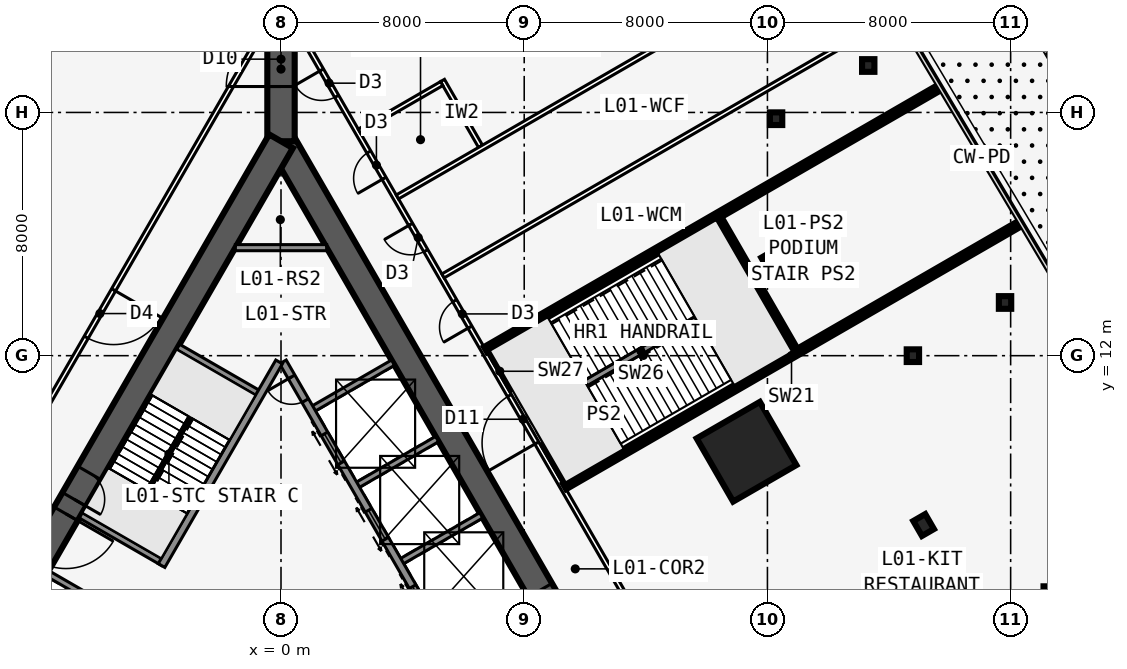
"""IFC4 building model, lengths in metres.
Left out: names, types, materials, properties, quantities, classifications, styles, units other than length and angle.
Written with IfcOpenShell. Run it as: python <this file> out.ifc"""

import sys

from ifc_helpers import new_model, si_unit, direction, frame, frame_2d, origin, origin_2d, place, context, subcontext, project, spatial, rectangle, i_section, extrude, element, fill, save


model = new_model("IFC4")
c1 = context("Model", 3, precision=1e-05, world=origin(), true_north=direction((0.0, 1.0)))
c2 = subcontext(c1, "Body", "Model", "MODEL_VIEW")
j1 = project(units=[si_unit("LENGTHUNIT", "METRE"), si_unit("PLANEANGLEUNIT", "RADIAN")], contexts=[c1])
p1 = place(None, origin())
s1 = spatial("IfcSite", under=j1, at=p1, CompositionType="ELEMENT")
p2 = place(p1, origin())
s2 = spatial("IfcBuilding", under=s1, at=p2, CompositionType="ELEMENT")
p3 = place(p2, frame((0.0, 0.0, 6.0)))
s3 = spatial("IfcBuildingStorey", under=s2, at=p3, CompositionType="ELEMENT", Elevation=6.0)
p4 = place(p3, frame((16.5, -9.526, 0.0), z_axis=(0.0, 0.0, 1.0), x_axis=(-0.499999749417, 0.866025548458, 0.0)))
e1 = element("IfcWall", 1, at=p4, inside=s3, PredefinedType="SHEAR", context=c2, shape_type="SweptSolid", body=[
    extrude(rectangle(XDim=33.0, YDim=0.9, at=frame_2d((16.5, 0.0))), origin(), (0.0, 0.0, 1.0), 5.0),
])
p5 = place(p4, frame((14.15, 0.0, 0.0)))
e2 = element("IfcOpeningElement", 2, at=p5, cuts=e1, PredefinedType="OPENING", context=c2, shape_type="SweptSolid", body=[
    extrude(rectangle(XDim=1.8, YDim=2.13, at=frame_2d((0.9, 1.065))), frame((0.0, 0.46, 0.0), z_axis=(0.0, -1.0, 0.0), x_axis=(1.0, 0.0, 0.0)), (0.0, 0.0, 1.0), 0.92),
])
p6 = place(p4, frame((12.6, 0.0, 0.0)))
e3 = element("IfcOpeningElement", 3, at=p6, cuts=e1, PredefinedType="OPENING", context=c2, shape_type="SweptSolid", body=[
    extrude(rectangle(XDim=1.0, YDim=2.13, at=frame_2d((0.5, 1.065))), frame((0.0, 0.46, 0.0), z_axis=(0.0, -1.0, 0.0), x_axis=(1.0, 0.0, 0.0)), (0.0, 0.0, 1.0), 0.92),
])
p7 = place(p3, frame((5.379, 2.586, 0.0), z_axis=(0.0, 0.0, 1.0), x_axis=(-0.500001375892, 0.866024609411, 0.0)))
e4 = element("IfcWall", 4, at=p7, inside=s3, PredefinedType="SOLIDWALL", context=c2, shape_type="SweptSolid", body=[
    extrude(rectangle(XDim=10.633, YDim=0.25, at=frame_2d((5.316, 0.0))), origin(), (0.0, 0.0, 1.0), 4.75),
])
p8 = place(p7, frame((9.164, 0.0, 0.0)))
e5 = element("IfcOpeningElement", 5, at=p8, cuts=e4, PredefinedType="OPENING", context=c2, shape_type="SweptSolid", body=[
    extrude(rectangle(XDim=0.9, YDim=2.13, at=frame_2d((0.45, 1.065))), frame((0.0, 0.135, 0.0), z_axis=(0.0, -1.0, 0.0), x_axis=(1.0, 0.0, 0.0)), (0.0, 0.0, 1.0), 0.27),
])
p9 = place(p7, frame((1.0, 0.0, 0.0)))
e6 = element("IfcOpeningElement", 6, at=p9, cuts=e4, PredefinedType="OPENING", context=c2, shape_type="SweptSolid", body=[
    extrude(rectangle(XDim=1.1, YDim=2.13, at=frame_2d((0.55, 1.065))), frame((0.0, 0.135, 0.0), z_axis=(0.0, -1.0, 0.0), x_axis=(1.0, 0.0, 0.0)), (0.0, 0.0, 1.0), 0.27),
])
p10 = place(p7, frame((3.9, 0.0, 0.0)))
e7 = element("IfcOpeningElement", 7, at=p10, cuts=e4, PredefinedType="OPENING", context=c2, shape_type="SweptSolid", body=[
    extrude(rectangle(XDim=1.1, YDim=2.13, at=frame_2d((0.55, 1.065))), frame((0.0, 0.135, 0.0), z_axis=(0.0, -1.0, 0.0), x_axis=(1.0, 0.0, 0.0)), (0.0, 0.0, 1.0), 0.27),
])
p11 = place(p7, frame((6.8, 0.0, 0.0)))
e8 = element("IfcOpeningElement", 8, at=p11, cuts=e4, PredefinedType="OPENING", context=c2, shape_type="SweptSolid", body=[
    extrude(rectangle(XDim=1.1, YDim=2.13, at=frame_2d((0.55, 1.065))), frame((0.0, 0.135, 0.0), z_axis=(0.0, -1.0, 0.0), x_axis=(1.0, 0.0, 0.0)), (0.0, 0.0, 1.0), 0.27),
])
for number, where, z_axis, x_axis in (
    (9, (3.879, 5.184, 0.0), (0.0, 0.0, 1.0), (0.866, 0.5, 0.0)),
    (10, (2.429, 7.696, 0.0), (0.0, 0.0, 1.0), (0.866, 0.5, 0.0)),
    (11, (0.979, 10.207, 0.0), (0.0, 0.0, 1.0), (0.866, 0.5, 0.0)),
):
    element("IfcWall", number, at=place(p3, frame(where, z_axis=z_axis, x_axis=x_axis)), inside=s3, PredefinedType="SOLIDWALL", context=c2, shape_type="SweptSolid", body=[
        extrude(rectangle(XDim=3.125, YDim=0.2, at=frame_2d((1.562, 0.0))), origin(), (0.0, 0.0, 1.0), 4.75),
    ])
p12 = place(p3, frame((0.0, 19.052, 0.0), z_axis=(0.0, 0.0, 1.0), x_axis=(-0.499999749417, -0.866025548458, 0.0)))
e12 = element("IfcWall", 12, at=p12, inside=s3, PredefinedType="SHEAR", context=c2, shape_type="SweptSolid", body=[
    extrude(rectangle(XDim=33.0, YDim=0.9, at=frame_2d((16.5, 0.0))), origin(), (0.0, 0.0, 1.0), 5.0),
])
p13 = place(p12, frame((14.15, 0.0, 0.0)))
e13 = element("IfcOpeningElement", 13, at=p13, cuts=e12, PredefinedType="OPENING", context=c2, shape_type="SweptSolid", body=[
    extrude(rectangle(XDim=1.8, YDim=2.13, at=frame_2d((0.9, 1.065))), frame((0.0, 0.46, 0.0), z_axis=(0.0, -1.0, 0.0), x_axis=(1.0, 0.0, 0.0)), (0.0, 0.0, 1.0), 0.92),
])
p14 = place(p12, frame((12.6, 0.0, 0.0)))
e14 = element("IfcOpeningElement", 14, at=p14, cuts=e12, PredefinedType="OPENING", context=c2, shape_type="SweptSolid", body=[
    extrude(rectangle(XDim=1.0, YDim=2.13, at=frame_2d((0.5, 1.065))), frame((0.0, 0.46, 0.0), z_axis=(0.0, -1.0, 0.0), x_axis=(1.0, 0.0, 0.0)), (0.0, 0.0, 1.0), 0.92),
])
p15 = place(p3, frame((-0.062, 11.794, 0.0), z_axis=(0.0, 0.0, 1.0), x_axis=(-0.500006680225, -0.86602154692, 0.0)))
e15 = element("IfcWall", 15, at=p15, inside=s3, PredefinedType="SOLIDWALL", context=c2, shape_type="SweptSolid", body=[
    extrude(rectangle(XDim=7.733, YDim=0.25, at=frame_2d((3.866, 0.0))), origin(), (0.0, 0.0, 1.0), 4.75),
])
for number, where, z_axis, x_axis in (
    (16, (-0.679, 10.727, 0.0), (0.0, 0.0, 1.0), (-0.866, 0.5, 0.0)),
    (17, (-3.879, 5.184, 0.0), (0.0, 0.0, 1.0), (-0.866, 0.5, 0.0)),
    (18, (-4.979, 3.279, 0.0), (0.0, 0.0, 1.0), (-0.866, 0.5, 0.0)),
):
    element("IfcWall", number, at=place(p3, frame(where, z_axis=z_axis, x_axis=x_axis)), inside=s3, PredefinedType="SOLIDWALL", context=c2, shape_type="SweptSolid", body=[
        extrude(rectangle(XDim=3.125, YDim=0.2, at=frame_2d((1.562, 0.0))), origin(), (0.0, 0.0, 1.0), 4.75),
    ])
p16 = place(p3, frame((0.0, 19.052, 0.0), z_axis=(0.0, 0.0, 1.0), x_axis=(0.0, 1.0, 0.0)))
e19 = element("IfcWall", 19, at=p16, inside=s3, PredefinedType="SHEAR", context=c2, shape_type="SweptSolid", body=[
    extrude(rectangle(XDim=4.746, YDim=0.9, at=frame_2d((2.373, 0.0))), origin(), (0.0, 0.0, 1.0), 5.0),
])
p17 = place(p16, frame((1.8, 0.0, 0.0)))
e20 = element("IfcOpeningElement", 20, at=p17, cuts=e19, PredefinedType="OPENING", context=c2, shape_type="SweptSolid", body=[
    extrude(rectangle(XDim=1.8, YDim=2.13, at=frame_2d((0.9, 1.065))), frame((0.0, 0.46, 0.0), z_axis=(0.0, -1.0, 0.0), x_axis=(1.0, 0.0, 0.0)), (0.0, 0.0, 1.0), 0.92),
])
for number, where, z_axis, x_axis in (
    (21, (21.137, 6.43, 0.0), (0.0, 0.0, 1.0), (0.866, 0.5, 0.0)),
    (22, (16.137, 15.09, 0.0), (0.0, 0.0, 1.0), (0.866, 0.5, 0.0)),
):
    element("IfcColumn", number, at=place(p3, frame(where, z_axis=z_axis, x_axis=x_axis)), inside=s3, PredefinedType="COLUMN", context=c2, shape_type="SweptSolid", body=[
        extrude(i_section(OverallWidth=0.455, OverallDepth=0.569, WebThickness=0.078, FlangeThickness=0.125, at=origin_2d()), origin(), (0.0, 0.0, 1.0), 5.0),
    ])
for number, where, z_axis, x_axis in (
    (23, (25.285, 4.206, 0.0), (0.0, 0.0, 1.0), (1.0, 0.0, 0.0)),
    (24, (20.785, 12.0, 0.0), (0.0, 0.0, 1.0), (1.0, 0.0, 0.0)),
    (25, (16.285, 19.794, 0.0), (0.0, 0.0, 1.0), (1.0, 0.0, 0.0)),
    (26, (23.816, 13.75, 0.0), (0.0, 0.0, 1.0), (1.0, 0.0, 0.0)),
    (27, (19.316, 21.544, 0.0), (0.0, 0.0, 1.0), (1.0, 0.0, 0.0)),
):
    element("IfcColumn", number, at=place(p3, frame(where, z_axis=z_axis, x_axis=x_axis)), inside=s3, PredefinedType="COLUMN", context=c2, shape_type="SweptSolid", body=[
        extrude(i_section(OverallWidth=0.406, OverallDepth=0.417, WebThickness=0.03, FlangeThickness=0.048, at=origin_2d()), origin(), (0.0, 0.0, 1.0), 5.0),
    ])
p18 = place(p3, frame((15.312, 8.84, 0.0), z_axis=(0.0, 0.0, 1.0), x_axis=(0.866025403784, 0.5, 0.0)))
e28 = element("IfcColumn", 28, at=p18, inside=s3, PredefinedType="COLUMN", context=c2, shape_type="SweptSolid", body=[
    extrude(rectangle(XDim=2.4, YDim=2.4, at=origin_2d()), origin(), (0.0, 0.0, 1.0), 5.0),
])
p19 = place(p3, frame((20.027, -10.985, 0.0), z_axis=(0.0, 0.0, 1.0), x_axis=(-0.500001677587, 0.866024435227, 0.0)))
e29 = element("IfcWall", 29, at=p19, inside=s3, PredefinedType="PARTITIONING", context=c2, shape_type="SweptSolid", body=[
    extrude(rectangle(XDim=39.054, YDim=0.15, at=frame_2d((19.527, 0.0))), origin(), (0.0, 0.0, 1.0), 3.808),
])
p20 = place(p19, frame((10.013, 0.0, 0.0)))
e30 = element("IfcOpeningElement", 30, at=p20, cuts=e29, PredefinedType="OPENING", context=c2, shape_type="SweptSolid", body=[
    extrude(rectangle(XDim=1.8, YDim=2.13, at=frame_2d((0.9, 1.065))), frame((0.0, 0.085, 0.0), z_axis=(0.0, -1.0, 0.0), x_axis=(1.0, 0.0, 0.0)), (0.0, 0.0, 1.0), 0.17),
])
p21 = place(p19, frame((23.227, 0.0, 0.0)))
e31 = element("IfcOpeningElement", 31, at=p21, cuts=e29, PredefinedType="OPENING", context=c2, shape_type="SweptSolid", body=[
    extrude(rectangle(XDim=1.8, YDim=2.13, at=frame_2d((0.9, 1.065))), frame((0.0, 0.085, 0.0), z_axis=(0.0, -1.0, 0.0), x_axis=(1.0, 0.0, 0.0)), (0.0, 0.0, 1.0), 0.17),
])
p22 = place(p19, frame((27.627, 0.0, 0.0)))
e32 = element("IfcOpeningElement", 32, at=p22, cuts=e29, PredefinedType="OPENING", context=c2, shape_type="SweptSolid", body=[
    extrude(rectangle(XDim=1.0, YDim=2.13, at=frame_2d((0.5, 1.065))), frame((0.0, 0.085, 0.0), z_axis=(0.0, -1.0, 0.0), x_axis=(1.0, 0.0, 0.0)), (0.0, 0.0, 1.0), 0.17),
])
p23 = place(p19, frame((30.527, 0.0, 0.0)))
e33 = element("IfcOpeningElement", 33, at=p23, cuts=e29, PredefinedType="OPENING", context=c2, shape_type="SweptSolid", body=[
    extrude(rectangle(XDim=1.0, YDim=2.13, at=frame_2d((0.5, 1.065))), frame((0.0, 0.085, 0.0), z_axis=(0.0, -1.0, 0.0), x_axis=(1.0, 0.0, 0.0)), (0.0, 0.0, 1.0), 0.17),
])
p24 = place(p19, frame((33.277, 0.0, 0.0)))
e34 = element("IfcOpeningElement", 34, at=p24, cuts=e29, PredefinedType="OPENING", context=c2, shape_type="SweptSolid", body=[
    extrude(rectangle(XDim=1.0, YDim=2.13, at=frame_2d((0.5, 1.065))), frame((0.0, 0.085, 0.0), z_axis=(0.0, -1.0, 0.0), x_axis=(1.0, 0.0, 0.0)), (0.0, 0.0, 1.0), 0.17),
])
p25 = place(p19, frame((36.39, 0.0, 0.0)))
e35 = element("IfcOpeningElement", 35, at=p25, cuts=e29, PredefinedType="OPENING", context=c2, shape_type="SweptSolid", body=[
    extrude(rectangle(XDim=1.0, YDim=2.13, at=frame_2d((0.5, 1.065))), frame((0.0, 0.085, 0.0), z_axis=(0.0, -1.0, 0.0), x_axis=(1.0, 0.0, 0.0)), (0.0, 0.0, 1.0), 0.17),
])
p26 = place(p3, frame((9.329, 7.695, 0.0), z_axis=(0.0, 0.0, 1.0), x_axis=(0.866030143687, 0.499991790157, 0.0)))
e36 = element("IfcWall", 36, at=p26, inside=s3, PredefinedType="SHEAR", context=c2, shape_type="SweptSolid", body=[
    extrude(rectangle(XDim=17.236, YDim=0.2, at=frame_2d((8.618, 0.0))), origin(), (0.0, 0.0, 1.0), 5.0),
])
p27 = place(p3, frame((6.729, 12.198, 0.0), z_axis=(0.0, 0.0, 1.0), x_axis=(0.866023831254, 0.500002723692, 0.0)))
e37 = element("IfcWall", 37, at=p27, inside=s3, PredefinedType="SHEAR", context=c2, shape_type="SweptSolid", body=[
    extrude(rectangle(XDim=17.167, YDim=0.2, at=frame_2d((8.583, 0.0))), origin(), (0.0, 0.0, 1.0), 5.0),
])
p28 = place(p3, frame((5.329, 14.623, 0.0), z_axis=(0.0, 0.0, 1.0), x_axis=(0.866023280993, 0.500003676764, 0.0)))
e38 = element("IfcWall", 38, at=p28, inside=s3, PredefinedType="PARTITIONING", context=c2, shape_type="SweptSolid", body=[
    extrude(rectangle(XDim=17.033, YDim=0.15, at=frame_2d((8.517, 0.0))), origin(), (0.0, 0.0, 1.0), 3.808),
])
p29 = place(p3, frame((3.829, 17.221, 0.0), z_axis=(0.0, 0.0, 1.0), x_axis=(0.86602357085, 0.500003174723, 0.0)))
e39 = element("IfcWall", 39, at=p29, inside=s3, PredefinedType="PARTITIONING", context=c2, shape_type="SweptSolid", body=[
    extrude(rectangle(XDim=16.914, YDim=0.15, at=frame_2d((8.457, 0.0))), origin(), (0.0, 0.0, 1.0), 4.75),
])
p30 = place(p3, frame((6.562, 18.886, 0.0), z_axis=(0.0, 0.0, 1.0), x_axis=(-0.500004234368, 0.866022959057, 0.0)))
e40 = element("IfcWall", 40, at=p30, inside=s3, PredefinedType="PARTITIONING", context=c2, shape_type="SweptSolid", body=[
    extrude(rectangle(XDim=2.5, YDim=0.15, at=frame_2d((1.25, 0.0))), origin(), (0.0, 0.0, 1.0), 4.75),
])
p31 = place(p3, frame((2.579, 19.386, 0.0), z_axis=(0.0, 0.0, 1.0), x_axis=(0.866022959057, 0.500004234368, 0.0)))
e41 = element("IfcWall", 41, at=p31, inside=s3, PredefinedType="PARTITIONING", context=c2, shape_type="SweptSolid", body=[
    extrude(rectangle(XDim=3.125, YDim=0.15, at=frame_2d((1.562, 0.0))), origin(), (0.0, 0.0, 1.0), 4.75),
])
p32 = place(p3, frame((-0.5, 22.836, 0.0), z_axis=(0.0, 0.0, 1.0), x_axis=(-0.500001677587, -0.866024435227, 0.0)))
e42 = element("IfcWall", 42, at=p32, inside=s3, PredefinedType="PARTITIONING", context=c2, shape_type="SweptSolid", body=[
    extrude(rectangle(XDim=39.054, YDim=0.15, at=frame_2d((19.527, 0.0))), origin(), (0.0, 0.0, 1.0), 3.808),
])
p33 = place(p32, frame((10.013, 0.0, 0.0)))
e43 = element("IfcOpeningElement", 43, at=p33, cuts=e42, PredefinedType="OPENING", context=c2, shape_type="SweptSolid", body=[
    extrude(rectangle(XDim=1.8, YDim=2.13, at=frame_2d((0.9, 1.065))), frame((0.0, 0.085, 0.0), z_axis=(0.0, -1.0, 0.0), x_axis=(1.0, 0.0, 0.0)), (0.0, 0.0, 1.0), 0.17),
])
p34 = place(p32, frame((23.227, 0.0, 0.0)))
e44 = element("IfcOpeningElement", 44, at=p34, cuts=e42, PredefinedType="OPENING", context=c2, shape_type="SweptSolid", body=[
    extrude(rectangle(XDim=1.8, YDim=2.13, at=frame_2d((0.9, 1.065))), frame((0.0, 0.085, 0.0), z_axis=(0.0, -1.0, 0.0), x_axis=(1.0, 0.0, 0.0)), (0.0, 0.0, 1.0), 0.17),
])
p35 = place(p32, frame((27.627, 0.0, 0.0)))
e45 = element("IfcOpeningElement", 45, at=p35, cuts=e42, PredefinedType="OPENING", context=c2, shape_type="SweptSolid", body=[
    extrude(rectangle(XDim=1.0, YDim=2.13, at=frame_2d((0.5, 1.065))), frame((0.0, 0.085, 0.0), z_axis=(0.0, -1.0, 0.0), x_axis=(1.0, 0.0, 0.0)), (0.0, 0.0, 1.0), 0.17),
])
p36 = place(p32, frame((30.277, 0.0, 0.0)))
e46 = element("IfcOpeningElement", 46, at=p36, cuts=e42, PredefinedType="OPENING", context=c2, shape_type="SweptSolid", body=[
    extrude(rectangle(XDim=1.0, YDim=2.13, at=frame_2d((0.5, 1.065))), frame((0.0, 0.085, 0.0), z_axis=(0.0, -1.0, 0.0), x_axis=(1.0, 0.0, 0.0)), (0.0, 0.0, 1.0), 0.17),
])
p37 = place(p32, frame((34.89, 0.0, 0.0)))
e47 = element("IfcOpeningElement", 47, at=p37, cuts=e42, PredefinedType="OPENING", context=c2, shape_type="SweptSolid", body=[
    extrude(rectangle(XDim=1.0, YDim=2.13, at=frame_2d((0.5, 1.065))), frame((0.0, 0.085, 0.0), z_axis=(0.0, -1.0, 0.0), x_axis=(1.0, 0.0, 0.0)), (0.0, 0.0, 1.0), 0.17),
])
p38 = place(p3, frame((-1.501, 15.552, 0.0), z_axis=(0.0, 0.0, 1.0), x_axis=(1.0, 0.0, 0.0)))
e48 = element("IfcWall", 48, at=p38, inside=s3, PredefinedType="SOLIDWALL", context=c2, shape_type="SweptSolid", body=[
    extrude(rectangle(XDim=3.002, YDim=0.2, at=frame_2d((1.501, 0.0))), origin(), (0.0, 0.0, 1.0), 4.75),
])
p39 = place(p3, frame((-2.988, 9.978, 0.0), z_axis=(0.0, 0.0, 1.0), x_axis=(-0.499992232847, -0.866029888106, 0.0)))
e49 = element("IfcWall", 49, at=p39, inside=s3, PredefinedType="SOLIDWALL", context=c2, shape_type="SweptSolid", body=[
    extrude(rectangle(XDim=2.794, YDim=0.1, at=frame_2d((1.397, 0.0))), origin(), (0.0, 0.0, 1.0), 5.0),
])
p40 = place(p3, frame((16.949, 12.095, 0.0), z_axis=(0.0, 0.0, 1.0), x_axis=(-0.499992051641, 0.866029992723, 0.0)))
e50 = element("IfcWall", 50, at=p40, inside=s3, PredefinedType="SHEAR", context=c2, shape_type="SweptSolid", body=[
    extrude(rectangle(XDim=5.2, YDim=0.2, at=frame_2d((2.6, 0.0))), origin(), (0.0, 0.0, 1.0), 5.0),
])
p41 = place(p3, frame((9.322, 7.807, 0.0), z_axis=(0.0, 0.0, 1.0), x_axis=(-0.500060622324, 0.86599040064, 0.0)))
e51 = element("IfcWall", 51, at=p41, inside=s3, PredefinedType="SOLIDWALL", context=c2, shape_type="SweptSolid", body=[
    extrude(rectangle(XDim=1.5, YDim=0.1, at=frame_2d((0.75, 0.0))), origin(), (0.0, 0.0, 1.0), 5.0),
])
p42 = place(p3, frame((7.572, 10.838, 0.0), z_axis=(0.0, 0.0, 1.0), x_axis=(-0.499990139034, 0.866031096941, 0.0)))
e52 = element("IfcWall", 52, at=p42, inside=s3, PredefinedType="SOLIDWALL", context=c2, shape_type="SweptSolid", body=[
    extrude(rectangle(XDim=1.5, YDim=0.1, at=frame_2d((0.75, 0.0))), origin(), (0.0, 0.0, 1.0), 5.0),
])
p43 = place(p3, frame((10.023, 11.098, 0.0), z_axis=(0.0, 0.0, 1.0), x_axis=(0.866031452229, 0.49998952364, 0.0)))
e53 = element("IfcWall", 53, at=p43, inside=s3, PredefinedType="SOLIDWALL", context=c2, shape_type="SweptSolid", body=[
    extrude(rectangle(XDim=4.194, YDim=0.2, at=frame_2d((2.097, 0.0))), origin(), (0.0, 0.0, 1.0), 5.0),
])
p44 = place(p21, origin())
e54 = element("IfcDoor", 54, at=p44, inside=s3, OperationType="DOUBLE_DOOR_SINGLE_SWING", PredefinedType="DOOR", context=c2, shape_type="SweptSolid", body=[
    extrude(rectangle(XDim=1.8, YDim=2.13, at=frame_2d((0.9, 1.065))), frame((0.0, 0.025, 0.0), z_axis=(0.0, -1.0, 0.0), x_axis=(1.0, 0.0, 0.0)), (0.0, 0.0, 1.0), 0.05),
])
fill(e31, e54)
p45 = place(p22, origin())
e55 = element("IfcDoor", 55, at=p45, inside=s3, OperationType="SINGLE_SWING_LEFT", PredefinedType="DOOR", context=c2, shape_type="SweptSolid", body=[
    extrude(rectangle(XDim=1.0, YDim=2.13, at=frame_2d((0.5, 1.065))), frame((0.0, 0.025, 0.0), z_axis=(0.0, -1.0, 0.0), x_axis=(1.0, 0.0, 0.0)), (0.0, 0.0, 1.0), 0.05),
])
fill(e32, e55)
p46 = place(p23, origin())
e56 = element("IfcDoor", 56, at=p46, inside=s3, OperationType="SINGLE_SWING_RIGHT", PredefinedType="DOOR", context=c2, shape_type="SweptSolid", body=[
    extrude(rectangle(XDim=1.0, YDim=2.13, at=frame_2d((0.5, 1.065))), frame((0.0, 0.025, 0.0), z_axis=(0.0, -1.0, 0.0), x_axis=(1.0, 0.0, 0.0)), (0.0, 0.0, 1.0), 0.05),
])
fill(e33, e56)
p47 = place(p24, origin())
e57 = element("IfcDoor", 57, at=p47, inside=s3, OperationType="SINGLE_SWING_LEFT", PredefinedType="DOOR", context=c2, shape_type="SweptSolid", body=[
    extrude(rectangle(XDim=1.0, YDim=2.13, at=frame_2d((0.5, 1.065))), frame((0.0, 0.025, 0.0), z_axis=(0.0, -1.0, 0.0), x_axis=(1.0, 0.0, 0.0)), (0.0, 0.0, 1.0), 0.05),
])
fill(e34, e57)
p48 = place(p25, origin())
e58 = element("IfcDoor", 58, at=p48, inside=s3, OperationType="SINGLE_SWING_RIGHT", PredefinedType="DOOR", context=c2, shape_type="SweptSolid", body=[
    extrude(rectangle(XDim=1.0, YDim=2.13, at=frame_2d((0.5, 1.065))), frame((0.0, 0.025, 0.0), z_axis=(0.0, -1.0, 0.0), x_axis=(1.0, 0.0, 0.0)), (0.0, 0.0, 1.0), 0.05),
])
fill(e35, e58)
p49 = place(p33, origin())
e59 = element("IfcDoor", 59, at=p49, inside=s3, OperationType="DOUBLE_DOOR_SINGLE_SWING", PredefinedType="DOOR", context=c2, shape_type="SweptSolid", body=[
    extrude(rectangle(XDim=1.8, YDim=2.13, at=frame_2d((0.9, 1.065))), frame((0.0, 0.025, 0.0), z_axis=(0.0, -1.0, 0.0), x_axis=(1.0, 0.0, 0.0)), (0.0, 0.0, 1.0), 0.05),
])
fill(e43, e59)
p50 = place(p13, origin())
e60 = element("IfcDoor", 60, at=p50, inside=s3, OperationType="DOUBLE_DOOR_SINGLE_SWING", PredefinedType="DOOR", context=c2, shape_type="SweptSolid", body=[
    extrude(rectangle(XDim=1.8, YDim=2.13, at=frame_2d((0.9, 1.065))), frame((0.0, 0.025, 0.0), z_axis=(0.0, -1.0, 0.0), x_axis=(1.0, 0.0, 0.0)), (0.0, 0.0, 1.0), 0.05),
])
fill(e13, e60)
p51 = place(p14, origin())
e61 = element("IfcDoor", 61, at=p51, inside=s3, OperationType="SINGLE_SWING_RIGHT", PredefinedType="DOOR", context=c2, shape_type="SweptSolid", body=[
    extrude(rectangle(XDim=1.0, YDim=2.13, at=frame_2d((0.5, 1.065))), frame((0.0, 0.025, 0.0), z_axis=(0.0, -1.0, 0.0), x_axis=(1.0, 0.0, 0.0)), (0.0, 0.0, 1.0), 0.05),
])
fill(e14, e61)
p52 = place(p17, origin())
e62 = element("IfcDoor", 62, at=p52, inside=s3, OperationType="DOUBLE_DOOR_DOUBLE_SWING", PredefinedType="DOOR", context=c2, shape_type="SweptSolid", body=[
    extrude(rectangle(XDim=1.8, YDim=2.13, at=frame_2d((0.9, 1.065))), frame((0.0, 0.025, 0.0), z_axis=(0.0, -1.0, 0.0), x_axis=(1.0, 0.0, 0.0)), (0.0, 0.0, 1.0), 0.05),
])
fill(e20, e62)
p53 = place(p8, origin())
e63 = element("IfcDoor", 63, at=p53, inside=s3, OperationType="SINGLE_SWING_RIGHT", PredefinedType="DOOR", context=c2, shape_type="SweptSolid", body=[
    extrude(rectangle(XDim=0.9, YDim=2.13, at=frame_2d((0.45, 1.065))), frame((0.0, 0.025, 0.0), z_axis=(0.0, -1.0, 0.0), x_axis=(1.0, 0.0, 0.0)), (0.0, 0.0, 1.0), 0.05),
])
fill(e5, e63)
p54 = place(p9, origin())
e64 = element("IfcDoor", 64, at=p54, inside=s3, OperationType="DOUBLE_DOOR_SLIDING", PredefinedType="USERDEFINED", context=c2, shape_type="SweptSolid", body=[
    extrude(rectangle(XDim=1.1, YDim=2.13, at=frame_2d((0.55, 1.065))), frame((0.0, 0.025, 0.0), z_axis=(0.0, -1.0, 0.0), x_axis=(1.0, 0.0, 0.0)), (0.0, 0.0, 1.0), 0.05),
])
fill(e6, e64)
p55 = place(p10, origin())
e65 = element("IfcDoor", 65, at=p55, inside=s3, OperationType="DOUBLE_DOOR_SLIDING", PredefinedType="USERDEFINED", context=c2, shape_type="SweptSolid", body=[
    extrude(rectangle(XDim=1.1, YDim=2.13, at=frame_2d((0.55, 1.065))), frame((0.0, 0.025, 0.0), z_axis=(0.0, -1.0, 0.0), x_axis=(1.0, 0.0, 0.0)), (0.0, 0.0, 1.0), 0.05),
])
fill(e7, e65)
p56 = place(p11, origin())
e66 = element("IfcDoor", 66, at=p56, inside=s3, OperationType="DOUBLE_DOOR_SLIDING", PredefinedType="USERDEFINED", context=c2, shape_type="SweptSolid", body=[
    extrude(rectangle(XDim=1.1, YDim=2.13, at=frame_2d((0.55, 1.065))), frame((0.0, 0.025, 0.0), z_axis=(0.0, -1.0, 0.0), x_axis=(1.0, 0.0, 0.0)), (0.0, 0.0, 1.0), 0.05),
])
fill(e8, e66)
save(model, sys.argv[1])
